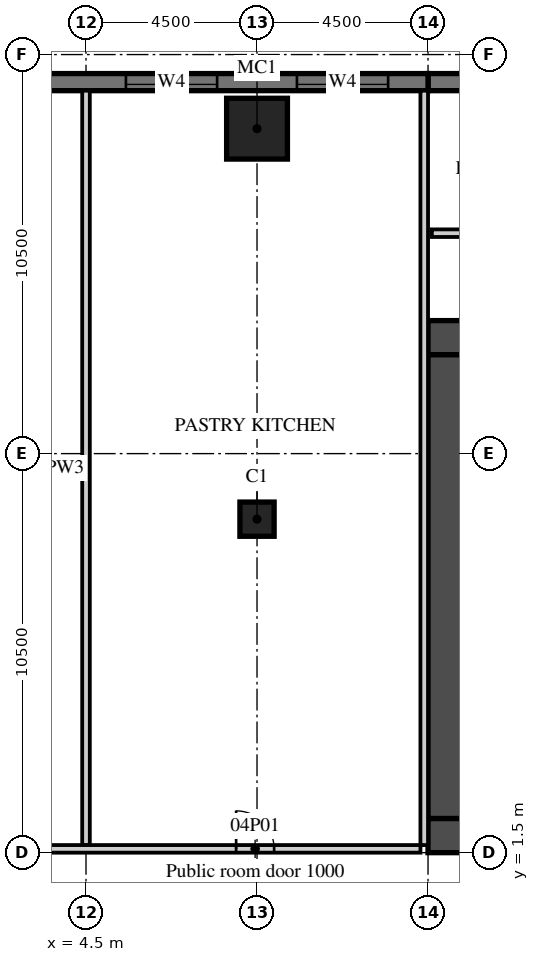
"""IFC4 building model, lengths in metres.
Left out: names, types, materials, properties, quantities, classifications, styles, units other than length and angle.
Written with IfcOpenShell. Run it as: python <this file> out.ifc"""

import sys

from ifc_helpers import new_model, si_unit, direction, frame, frame_2d, origin, origin_2d, place, context, subcontext, project, spatial, rectangle, extrude, element, fill, save


model = new_model("IFC4")
c1 = context("Model", 3, precision=1e-05, world=origin(), true_north=direction((0.0, 1.0)))
c2 = subcontext(c1, "Body", "Model", "MODEL_VIEW")
j1 = project(units=[si_unit("LENGTHUNIT", "METRE"), si_unit("PLANEANGLEUNIT", "RADIAN")], contexts=[c1])
p1 = place(None, origin())
s1 = spatial("IfcSite", under=j1, at=p1, CompositionType="ELEMENT")
p2 = place(p1, origin())
s2 = spatial("IfcBuilding", under=s1, at=p2, CompositionType="ELEMENT")
p3 = place(p2, frame((0.0, 0.0, 29.0)))
s3 = spatial("IfcBuildingStorey", under=s2, at=p3, CompositionType="ELEMENT", Elevation=29.0)
p4 = place(p3, frame((9.0, 20.55, 0.0), z_axis=(0.0, 0.0, 1.0), x_axis=(1.0, 0.0, 0.0)))
e1 = element("IfcColumn", 1, at=p4, inside=s3, PredefinedType="COLUMN", context=c2, shape_type="SweptSolid", body=[
    extrude(rectangle(XDim=1.6, YDim=1.6, at=origin_2d()), origin(), (0.0, 0.0, 1.0), 4.5),
])
p5 = place(p3, frame((9.0, 10.275, 0.0), z_axis=(0.0, 0.0, 1.0), x_axis=(1.0, 0.0, 0.0)))
e2 = element("IfcColumn", 2, at=p5, inside=s3, PredefinedType="COLUMN", context=c2, shape_type="SweptSolid", body=[
    extrude(rectangle(XDim=0.9, YDim=0.9, at=origin_2d()), origin(), (0.0, 0.0, 1.0), 4.5),
])
p6 = place(p3, frame((31.5, 21.775, 0.0), z_axis=(0.0, 0.0, 1.0), x_axis=(-1.0, 0.0, 0.0)))
e3 = element("IfcWall", 3, at=p6, inside=s3, PredefinedType="SOLIDWALL", context=c2, shape_type="SweptSolid", body=[
    extrude(rectangle(XDim=18.0, YDim=0.45, at=frame_2d((9.0, 0.0))), origin(), (0.0, 0.0, 1.0), 4.05),
])
p7 = place(p3, frame((13.5, 21.775, 0.0), z_axis=(0.0, 0.0, 1.0), x_axis=(-1.0, 0.0, 0.0)))
e4 = element("IfcWall", 4, at=p7, inside=s3, PredefinedType="SOLIDWALL", context=c2, shape_type="SweptSolid", body=[
    extrude(rectangle(XDim=54.5, YDim=0.45, at=frame_2d((27.25, 0.0))), origin(), (0.0, 0.0, 1.0), 4.05),
])
p8 = place(p7, frame((1.05, 0.0, 0.9)))
e5 = element("IfcOpeningElement", 5, at=p8, cuts=e4, PredefinedType="OPENING", context=c2, shape_type="SweptSolid", body=[
    extrude(rectangle(XDim=2.4, YDim=1.8, at=frame_2d((1.2, 0.9))), frame((0.0, 0.235, 0.0), z_axis=(0.0, -1.0, 0.0), x_axis=(1.0, 0.0, 0.0)), (0.0, 0.0, 1.0), 0.47),
])
p9 = place(p7, frame((5.55, 0.0, 0.9)))
e6 = element("IfcOpeningElement", 6, at=p9, cuts=e4, PredefinedType="OPENING", context=c2, shape_type="SweptSolid", body=[
    extrude(rectangle(XDim=2.4, YDim=1.8, at=frame_2d((1.2, 0.9))), frame((0.0, 0.235, 0.0), z_axis=(0.0, -1.0, 0.0), x_axis=(1.0, 0.0, 0.0)), (0.0, 0.0, 1.0), 0.47),
])
p10 = place(p7, frame((10.05, 0.0, 0.9)))
e7 = element("IfcOpeningElement", 7, at=p10, cuts=e4, PredefinedType="OPENING", context=c2, shape_type="SweptSolid", body=[
    extrude(rectangle(XDim=2.4, YDim=1.8, at=frame_2d((1.2, 0.9))), frame((0.0, 0.235, 0.0), z_axis=(0.0, -1.0, 0.0), x_axis=(1.0, 0.0, 0.0)), (0.0, 0.0, 1.0), 0.47),
])
p11 = place(p7, frame((14.55, 0.0, 0.9)))
e8 = element("IfcOpeningElement", 8, at=p11, cuts=e4, PredefinedType="OPENING", context=c2, shape_type="SweptSolid", body=[
    extrude(rectangle(XDim=2.4, YDim=1.8, at=frame_2d((1.2, 0.9))), frame((0.0, 0.235, 0.0), z_axis=(0.0, -1.0, 0.0), x_axis=(1.0, 0.0, 0.0)), (0.0, 0.0, 1.0), 0.47),
])
p12 = place(p7, frame((19.05, 0.0, 0.9)))
e9 = element("IfcOpeningElement", 9, at=p12, cuts=e4, PredefinedType="OPENING", context=c2, shape_type="SweptSolid", body=[
    extrude(rectangle(XDim=2.4, YDim=1.8, at=frame_2d((1.2, 0.9))), frame((0.0, 0.235, 0.0), z_axis=(0.0, -1.0, 0.0), x_axis=(1.0, 0.0, 0.0)), (0.0, 0.0, 1.0), 0.47),
])
p13 = place(p7, frame((23.55, 0.0, 0.9)))
e10 = element("IfcOpeningElement", 10, at=p13, cuts=e4, PredefinedType="OPENING", context=c2, shape_type="SweptSolid", body=[
    extrude(rectangle(XDim=2.4, YDim=1.8, at=frame_2d((1.2, 0.9))), frame((0.0, 0.235, 0.0), z_axis=(0.0, -1.0, 0.0), x_axis=(1.0, 0.0, 0.0)), (0.0, 0.0, 1.0), 0.47),
])
p14 = place(p7, frame((28.05, 0.0, 0.9)))
e11 = element("IfcOpeningElement", 11, at=p14, cuts=e4, PredefinedType="OPENING", context=c2, shape_type="SweptSolid", body=[
    extrude(rectangle(XDim=2.4, YDim=1.8, at=frame_2d((1.2, 0.9))), frame((0.0, 0.235, 0.0), z_axis=(0.0, -1.0, 0.0), x_axis=(1.0, 0.0, 0.0)), (0.0, 0.0, 1.0), 0.47),
])
p15 = place(p7, frame((32.55, 0.0, 0.9)))
e12 = element("IfcOpeningElement", 12, at=p15, cuts=e4, PredefinedType="OPENING", context=c2, shape_type="SweptSolid", body=[
    extrude(rectangle(XDim=2.4, YDim=1.8, at=frame_2d((1.2, 0.9))), frame((0.0, 0.235, 0.0), z_axis=(0.0, -1.0, 0.0), x_axis=(1.0, 0.0, 0.0)), (0.0, 0.0, 1.0), 0.47),
])
p16 = place(p7, frame((37.05, 0.0, 0.9)))
e13 = element("IfcOpeningElement", 13, at=p16, cuts=e4, PredefinedType="OPENING", context=c2, shape_type="SweptSolid", body=[
    extrude(rectangle(XDim=2.4, YDim=1.8, at=frame_2d((1.2, 0.9))), frame((0.0, 0.235, 0.0), z_axis=(0.0, -1.0, 0.0), x_axis=(1.0, 0.0, 0.0)), (0.0, 0.0, 1.0), 0.47),
])
p17 = place(p7, frame((41.55, 0.0, 0.9)))
e14 = element("IfcOpeningElement", 14, at=p17, cuts=e4, PredefinedType="OPENING", context=c2, shape_type="SweptSolid", body=[
    extrude(rectangle(XDim=2.4, YDim=1.8, at=frame_2d((1.2, 0.9))), frame((0.0, 0.235, 0.0), z_axis=(0.0, -1.0, 0.0), x_axis=(1.0, 0.0, 0.0)), (0.0, 0.0, 1.0), 0.47),
])
p18 = place(p7, frame((46.05, 0.0, 0.9)))
e15 = element("IfcOpeningElement", 15, at=p18, cuts=e4, PredefinedType="OPENING", context=c2, shape_type="SweptSolid", body=[
    extrude(rectangle(XDim=2.4, YDim=1.8, at=frame_2d((1.2, 0.9))), frame((0.0, 0.235, 0.0), z_axis=(0.0, -1.0, 0.0), x_axis=(1.0, 0.0, 0.0)), (0.0, 0.0, 1.0), 0.47),
])
p19 = place(p3, frame((13.5, 1.95, 0.0), z_axis=(0.0, 0.0, 1.0), x_axis=(1.0, 0.0, 0.0)))
e16 = element("IfcWall", 16, at=p19, inside=s3, PredefinedType="SHEAR", context=c2, shape_type="SweptSolid", body=[
    extrude(rectangle(XDim=18.0, YDim=0.9, at=frame_2d((9.0, 0.0))), origin(), (0.0, 0.0, 1.0), 4.05),
])
p20 = place(p19, frame((1.475, 0.0, 0.0)))
e17 = element("IfcOpeningElement", 17, at=p20, cuts=e16, PredefinedType="OPENING", context=c2, shape_type="SweptSolid", body=[
    extrude(rectangle(XDim=1.8, YDim=2.1, at=frame_2d((0.9, 1.05))), frame((0.0, 0.46, 0.0), z_axis=(0.0, -1.0, 0.0), x_axis=(1.0, 0.0, 0.0)), (0.0, 0.0, 1.0), 0.92),
])
p21 = place(p3, frame((13.5, 15.05, 0.0), z_axis=(0.0, 0.0, 1.0), x_axis=(1.0, 0.0, 0.0)))
e18 = element("IfcWall", 18, at=p21, inside=s3, PredefinedType="SHEAR", context=c2, shape_type="SweptSolid", body=[
    extrude(rectangle(XDim=6.8, YDim=0.9, at=frame_2d((3.4, 0.0))), origin(), (0.0, 0.0, 1.0), 4.05),
])
p22 = place(p21, frame((4.725, 0.0, 0.0)))
e19 = element("IfcOpeningElement", 19, at=p22, cuts=e18, PredefinedType="OPENING", context=c2, shape_type="SweptSolid", body=[
    extrude(rectangle(XDim=1.2, YDim=2.1, at=frame_2d((0.6, 1.05))), frame((0.0, 0.46, 0.0), z_axis=(0.0, -1.0, 0.0), x_axis=(1.0, 0.0, 0.0)), (0.0, 0.0, 1.0), 0.92),
])
p23 = place(p3, frame((13.95, 2.4, 0.0), z_axis=(0.0, 0.0, 1.0), x_axis=(0.0, 1.0, 0.0)))
e20 = element("IfcWall", 20, at=p23, inside=s3, PredefinedType="SHEAR", context=c2, shape_type="SweptSolid", body=[
    extrude(rectangle(XDim=12.2, YDim=0.9, at=frame_2d((6.1, 0.0))), origin(), (0.0, 0.0, 1.0), 4.05),
])
p24 = place(p3, frame((13.6, 17.8, 0.0), z_axis=(0.0, 0.0, 1.0), x_axis=(1.0, 0.0, 0.0)))
e21 = element("IfcWall", 21, at=p24, inside=s3, PredefinedType="PARTITIONING", context=c2, shape_type="SweptSolid", body=[
    extrude(rectangle(XDim=30.95, YDim=0.2, at=frame_2d((15.475, 0.0))), origin(), (0.0, 0.0, 1.0), 4.05),
])
p25 = place(p24, frame((16.613, 0.0, 0.0)))
e22 = element("IfcOpeningElement", 22, at=p25, cuts=e21, PredefinedType="OPENING", context=c2, shape_type="SweptSolid", body=[
    extrude(rectangle(XDim=0.9, YDim=2.1, at=frame_2d((0.45, 1.05))), frame((0.0, 0.11, 0.0), z_axis=(0.0, -1.0, 0.0), x_axis=(1.0, 0.0, 0.0)), (0.0, 0.0, 1.0), 0.22),
])
p26 = place(p24, frame((8.312, 0.0, 0.0)))
e23 = element("IfcOpeningElement", 23, at=p26, cuts=e21, PredefinedType="OPENING", context=c2, shape_type="SweptSolid", body=[
    extrude(rectangle(XDim=0.9, YDim=2.1, at=frame_2d((0.45, 1.05))), frame((0.0, 0.11, 0.0), z_axis=(0.0, -1.0, 0.0), x_axis=(1.0, 0.0, 0.0)), (0.0, 0.0, 1.0), 0.22),
])
p27 = place(p3, frame((4.5, 1.7, 0.0), z_axis=(0.0, 0.0, 1.0), x_axis=(0.0, 1.0, 0.0)))
e24 = element("IfcWall", 24, at=p27, inside=s3, PredefinedType="PARTITIONING", context=c2, shape_type="SweptSolid", body=[
    extrude(rectangle(XDim=19.85, YDim=0.2, at=frame_2d((9.925, 0.0))), origin(), (0.0, 0.0, 1.0), 4.05),
])
p28 = place(p3, frame((-39.4, 1.6, 0.0), z_axis=(0.0, 0.0, 1.0), x_axis=(1.0, 0.0, 0.0)))
e25 = element("IfcWall", 25, at=p28, inside=s3, PredefinedType="PARTITIONING", context=c2, shape_type="SweptSolid", body=[
    extrude(rectangle(XDim=52.7, YDim=0.2, at=frame_2d((26.35, 0.0))), origin(), (0.0, 0.0, 1.0), 4.05),
])
p29 = place(p28, frame((47.85, 0.0, 0.0)))
e26 = element("IfcOpeningElement", 26, at=p29, cuts=e25, PredefinedType="OPENING", context=c2, shape_type="SweptSolid", body=[
    extrude(rectangle(XDim=1.0, YDim=2.1, at=frame_2d((0.5, 1.05))), frame((0.0, 0.11, 0.0), z_axis=(0.0, -1.0, 0.0), x_axis=(1.0, 0.0, 0.0)), (0.0, 0.0, 1.0), 0.22),
])
p30 = place(p28, frame((37.96, 0.0, 0.0)))
e27 = element("IfcOpeningElement", 27, at=p30, cuts=e25, PredefinedType="OPENING", context=c2, shape_type="SweptSolid", body=[
    extrude(rectangle(XDim=1.0, YDim=2.1, at=frame_2d((0.5, 1.05))), frame((0.0, 0.11, 0.0), z_axis=(0.0, -1.0, 0.0), x_axis=(1.0, 0.0, 0.0)), (0.0, 0.0, 1.0), 0.22),
])
p31 = place(p28, frame((30.84, 0.0, 0.0)))
e28 = element("IfcOpeningElement", 28, at=p31, cuts=e25, PredefinedType="OPENING", context=c2, shape_type="SweptSolid", body=[
    extrude(rectangle(XDim=1.0, YDim=2.1, at=frame_2d((0.5, 1.05))), frame((0.0, 0.11, 0.0), z_axis=(0.0, -1.0, 0.0), x_axis=(1.0, 0.0, 0.0)), (0.0, 0.0, 1.0), 0.22),
])
p32 = place(p28, frame((23.375, 0.0, 0.0)))
e29 = element("IfcOpeningElement", 29, at=p32, cuts=e25, PredefinedType="OPENING", context=c2, shape_type="SweptSolid", body=[
    extrude(rectangle(XDim=1.2, YDim=2.1, at=frame_2d((0.6, 1.05))), frame((0.0, 0.11, 0.0), z_axis=(0.0, -1.0, 0.0), x_axis=(1.0, 0.0, 0.0)), (0.0, 0.0, 1.0), 0.22),
])
p33 = place(p28, frame((11.9, 0.0, 0.0)))
e30 = element("IfcOpeningElement", 30, at=p33, cuts=e25, PredefinedType="OPENING", context=c2, shape_type="SweptSolid", body=[
    extrude(rectangle(XDim=1.0, YDim=2.1, at=frame_2d((0.5, 1.05))), frame((0.0, 0.11, 0.0), z_axis=(0.0, -1.0, 0.0), x_axis=(1.0, 0.0, 0.0)), (0.0, 0.0, 1.0), 0.22),
])
p34 = place(p28, frame((3.5, 0.0, 0.0)))
e31 = element("IfcOpeningElement", 31, at=p34, cuts=e25, PredefinedType="OPENING", context=c2, shape_type="SweptSolid", body=[
    extrude(rectangle(XDim=1.0, YDim=2.1, at=frame_2d((0.5, 1.05))), frame((0.0, 0.11, 0.0), z_axis=(0.0, -1.0, 0.0), x_axis=(1.0, 0.0, 0.0)), (0.0, 0.0, 1.0), 0.22),
])
p35 = place(p3, frame((13.4, 1.7, 0.0), z_axis=(0.0, 0.0, 1.0), x_axis=(0.0, 1.0, 0.0)))
e32 = element("IfcWall", 32, at=p35, inside=s3, PredefinedType="PARTITIONING", context=c2, shape_type="SweptSolid", body=[
    extrude(rectangle(XDim=19.85, YDim=0.2, at=frame_2d((9.925, 0.0))), origin(), (0.0, 0.0, 1.0), 4.05),
])
p36 = place(p8, origin())
e33 = element("IfcWindow", 33, at=p36, inside=s3, PartitioningType="SINGLE_PANEL", PredefinedType="WINDOW", context=c2, shape_type="SweptSolid", body=[
    extrude(rectangle(XDim=2.4, YDim=1.8, at=frame_2d((1.2, 0.9))), frame((0.0, 0.09, 0.0), z_axis=(0.0, -1.0, 0.0), x_axis=(1.0, 0.0, 0.0)), (0.0, 0.0, 1.0), 0.06),
])
fill(e5, e33)
p37 = place(p9, origin())
e34 = element("IfcWindow", 34, at=p37, inside=s3, PartitioningType="SINGLE_PANEL", PredefinedType="WINDOW", context=c2, shape_type="SweptSolid", body=[
    extrude(rectangle(XDim=2.4, YDim=1.8, at=frame_2d((1.2, 0.9))), frame((0.0, 0.09, 0.0), z_axis=(0.0, -1.0, 0.0), x_axis=(1.0, 0.0, 0.0)), (0.0, 0.0, 1.0), 0.06),
])
fill(e6, e34)
p38 = place(p29, origin())
e35 = element("IfcDoor", 35, at=p38, inside=s3, OperationType="SINGLE_SWING_LEFT", PredefinedType="DOOR", context=c2, shape_type="SweptSolid", body=[
    extrude(rectangle(XDim=1.0, YDim=2.1, at=frame_2d((0.5, 1.05))), frame((0.0, 0.025, 0.0), z_axis=(0.0, -1.0, 0.0), x_axis=(1.0, 0.0, 0.0)), (0.0, 0.0, 1.0), 0.05),
])
fill(e26, e35)
save(model, sys.argv[1])
